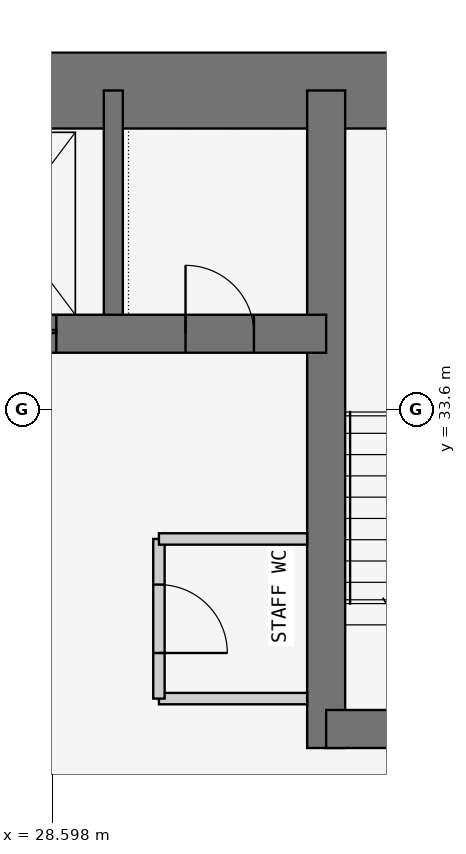
"""IFC4 building model, lengths in metres.
Left out: names, types, materials, properties, quantities, classifications, styles, units other than length and angle.
Written with IfcOpenShell. Run it as: python <this file> out.ifc"""

import sys

from ifc_helpers import new_model, si_unit, direction, frame, frame_2d, origin, place, context, subcontext, project, spatial, rectangle, extrude, element, fill, save


model = new_model("IFC4")
c1 = context("Model", 3, precision=1e-05, world=origin(), true_north=direction((0.0, 1.0)))
c2 = subcontext(c1, "Body", "Model", "MODEL_VIEW")
j1 = project(units=[si_unit("LENGTHUNIT", "METRE"), si_unit("PLANEANGLEUNIT", "RADIAN")], contexts=[c1])
p1 = place(None, origin())
s1 = spatial("IfcSite", under=j1, at=p1, CompositionType="ELEMENT")
p2 = place(p1, origin())
s2 = spatial("IfcBuilding", under=s1, at=p2, CompositionType="ELEMENT")
p3 = place(p2, frame((0.0, 0.0, 92.1)))
s3 = spatial("IfcBuildingStorey", under=s2, at=p3, CompositionType="ELEMENT", Elevation=92.1)
p4 = place(p3, frame((37.8, 37.8, 0.0), z_axis=(0.0, 0.0, 1.0), x_axis=(-1.0, 0.0, 0.0)))
e1 = element("IfcWall", 1, at=p4, inside=s3, PredefinedType="SHEAR", context=c2, shape_type="SweptSolid", body=[
    extrude(rectangle(XDim=17.3, YDim=1.0, at=frame_2d((8.65, 0.0))), origin(), (0.0, 0.0, 1.0), 3.6),
])
p5 = place(p3, frame((21.0, 34.6, 0.0), z_axis=(0.0, 0.0, 1.0), x_axis=(1.0, 0.0, 0.0)))
e2 = element("IfcWall", 2, at=p5, inside=s3, PredefinedType="SHEAR", context=c2, shape_type="SweptSolid", body=[
    extrude(rectangle(XDim=11.2, YDim=0.5, at=frame_2d((5.6, 0.0))), origin(), (0.0, 0.0, 1.0), 3.6),
])
p6 = place(p5, frame((9.35, 0.0, 0.0)))
e3 = element("IfcOpeningElement", 3, at=p6, cuts=e2, PredefinedType="OPENING", context=c2, shape_type="SweptSolid", body=[
    extrude(rectangle(XDim=0.9, YDim=2.1, at=frame_2d((0.45, 1.05))), frame((0.0, 0.26, 0.0), z_axis=(0.0, -1.0, 0.0), x_axis=(1.0, 0.0, 0.0)), (0.0, 0.0, 1.0), 0.52),
])
p7 = place(p5, frame((1.0, 0.0, 0.0)))
e4 = element("IfcOpeningElement", 4, at=p7, cuts=e2, PredefinedType="OPENING", context=c2, shape_type="SweptSolid", body=[
    extrude(rectangle(XDim=1.1, YDim=2.1, at=frame_2d((0.55, 1.05))), frame((0.0, 0.26, 0.0), z_axis=(0.0, -1.0, 0.0), x_axis=(1.0, 0.0, 0.0)), (0.0, 0.0, 1.0), 0.52),
])
p8 = place(p5, frame((3.65, 0.0, 0.0)))
e5 = element("IfcOpeningElement", 5, at=p8, cuts=e2, PredefinedType="OPENING", context=c2, shape_type="SweptSolid", body=[
    extrude(rectangle(XDim=1.1, YDim=2.1, at=frame_2d((0.55, 1.05))), frame((0.0, 0.26, 0.0), z_axis=(0.0, -1.0, 0.0), x_axis=(1.0, 0.0, 0.0)), (0.0, 0.0, 1.0), 0.52),
])
p9 = place(p5, frame((6.35, 0.0, 0.0)))
e6 = element("IfcOpeningElement", 6, at=p9, cuts=e2, PredefinedType="OPENING", context=c2, shape_type="SweptSolid", body=[
    extrude(rectangle(XDim=1.3, YDim=2.1, at=frame_2d((0.65, 1.05))), frame((0.0, 0.26, 0.0), z_axis=(0.0, -1.0, 0.0), x_axis=(1.0, 0.0, 0.0)), (0.0, 0.0, 1.0), 0.52),
])
p10 = place(p3, frame((32.2, 29.15, 0.0), z_axis=(0.0, 0.0, 1.0), x_axis=(0.0, 1.0, 0.0)))
e7 = element("IfcWall", 7, at=p10, inside=s3, PredefinedType="SHEAR", context=c2, shape_type="SweptSolid", body=[
    extrude(rectangle(XDim=8.65, YDim=0.5, at=frame_2d((4.325, 0.0))), origin(), (0.0, 0.0, 1.0), 3.6),
])
p11 = place(p3, frame((32.2, 29.4, 0.0), z_axis=(0.0, 0.0, 1.0), x_axis=(1.0, 0.0, 0.0)))
e8 = element("IfcWall", 8, at=p11, inside=s3, PredefinedType="SHEAR", context=c2, shape_type="SweptSolid", body=[
    extrude(rectangle(XDim=5.6, YDim=0.5, at=frame_2d((2.8, 0.0))), origin(), (0.0, 0.0, 1.0), 3.6),
])
p12 = place(p11, frame((2.0, 0.0, 0.0)))
e9 = element("IfcOpeningElement", 9, at=p12, cuts=e8, PredefinedType="OPENING", context=c2, shape_type="SweptSolid", body=[
    extrude(rectangle(XDim=1.2, YDim=2.1, at=frame_2d((0.6, 1.05))), frame((0.0, 0.26, 0.0), z_axis=(0.0, -1.0, 0.0), x_axis=(1.0, 0.0, 0.0)), (0.0, 0.0, 1.0), 0.52),
])
p13 = place(p3, frame((29.4, 34.6, 0.0), z_axis=(0.0, 0.0, 1.0), x_axis=(0.0, 1.0, 0.0)))
e10 = element("IfcWall", 10, at=p13, inside=s3, PredefinedType="SHEAR", context=c2, shape_type="SweptSolid", body=[
    extrude(rectangle(XDim=3.2, YDim=0.25, at=frame_2d((1.6, 0.0))), origin(), (0.0, 0.0, 1.0), 3.6),
])
p14 = place(p3, frame((31.95, 29.8, 0.0), z_axis=(0.0, 0.0, 1.0), x_axis=(-1.0, 0.0, 0.0)))
e11 = element("IfcWall", 11, at=p14, inside=s3, PredefinedType="PARTITIONING", context=c2, shape_type="SweptSolid", body=[
    extrude(rectangle(XDim=1.95, YDim=0.15, at=frame_2d((0.975, 0.0))), origin(), (0.0, 0.0, 1.0), 3.45),
])
p15 = place(p3, frame((30.0, 29.8, 0.0), z_axis=(0.0, 0.0, 1.0), x_axis=(0.0, 1.0, 0.0)))
e12 = element("IfcWall", 12, at=p15, inside=s3, PredefinedType="PARTITIONING", context=c2, shape_type="SweptSolid", body=[
    extrude(rectangle(XDim=2.1, YDim=0.15, at=frame_2d((1.05, 0.0))), origin(), (0.0, 0.0, 1.0), 3.45),
])
p16 = place(p15, frame((0.6, 0.0, 0.0)))
e13 = element("IfcOpeningElement", 13, at=p16, cuts=e12, PredefinedType="OPENING", context=c2, shape_type="SweptSolid", body=[
    extrude(rectangle(XDim=0.9, YDim=2.1, at=frame_2d((0.45, 1.05))), frame((0.0, 0.085, 0.0), z_axis=(0.0, -1.0, 0.0), x_axis=(1.0, 0.0, 0.0)), (0.0, 0.0, 1.0), 0.17),
])
p17 = place(p3, frame((30.0, 31.9, 0.0), z_axis=(0.0, 0.0, 1.0), x_axis=(1.0, 0.0, 0.0)))
e14 = element("IfcWall", 14, at=p17, inside=s3, PredefinedType="PARTITIONING", context=c2, shape_type="SweptSolid", body=[
    extrude(rectangle(XDim=1.95, YDim=0.15, at=frame_2d((0.975, 0.0))), origin(), (0.0, 0.0, 1.0), 3.45),
])
p18 = place(p6, origin())
e15 = element("IfcDoor", 15, at=p18, inside=s3, OperationType="SINGLE_SWING_LEFT", PredefinedType="DOOR", context=c2, shape_type="SweptSolid", body=[
    extrude(rectangle(XDim=0.9, YDim=2.1, at=frame_2d((0.45, 1.05))), frame((0.0, 0.025, 0.0), z_axis=(0.0, -1.0, 0.0), x_axis=(1.0, 0.0, 0.0)), (0.0, 0.0, 1.0), 0.05),
])
fill(e3, e15)
p19 = place(p16, frame((0.9, 0.0, 0.0), z_axis=(0.0, 0.0, 1.0), x_axis=(-1.0, 0.0, 0.0)))
e16 = element("IfcDoor", 16, at=p19, inside=s3, OperationType="SINGLE_SWING_RIGHT", PredefinedType="DOOR", context=c2, shape_type="SweptSolid", body=[
    extrude(rectangle(XDim=0.9, YDim=2.1, at=frame_2d((0.45, 1.05))), frame((0.0, 0.025, 0.0), z_axis=(0.0, -1.0, 0.0), x_axis=(1.0, 0.0, 0.0)), (0.0, 0.0, 1.0), 0.05),
])
fill(e13, e16)
p20 = place(p9, origin())
e17 = element("IfcDoor", 17, at=p20, inside=s3, OperationType="DOUBLE_DOOR_SLIDING", PredefinedType="DOOR", context=c2, shape_type="SweptSolid", body=[
    extrude(rectangle(XDim=1.3, YDim=2.1, at=frame_2d((0.65, 1.05))), frame((0.0, 0.025, 0.0), z_axis=(0.0, -1.0, 0.0), x_axis=(1.0, 0.0, 0.0)), (0.0, 0.0, 1.0), 0.05),
])
fill(e6, e17)
save(model, sys.argv[1])
